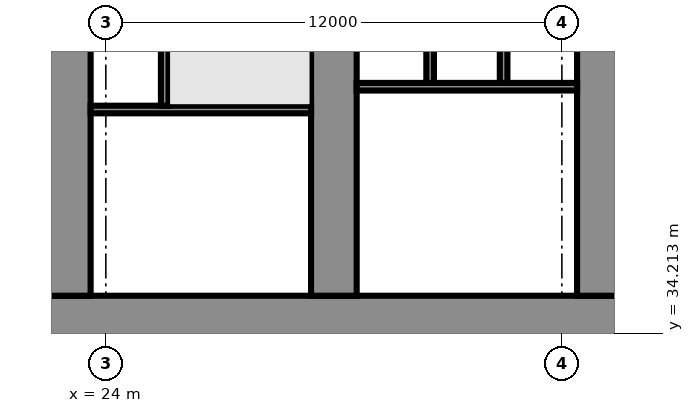
"""IFC4 building model, lengths in metres.
Left out: names, types, materials, properties, quantities, classifications, styles, units other than length and angle.
Written with IfcOpenShell. Run it as: python <this file> out.ifc"""

import sys

from ifc_helpers import new_model, si_unit, direction, frame, frame_2d, origin, place, context, subcontext, project, spatial, polyline, rectangle, outline, extrude, element, fill, save


model = new_model("IFC4")
c1 = context("Model", 3, precision=1e-05, world=origin(), true_north=direction((0.0, 1.0)))
c2 = subcontext(c1, "Body", "Model", "MODEL_VIEW")
j1 = project(units=[si_unit("LENGTHUNIT", "METRE"), si_unit("PLANEANGLEUNIT", "RADIAN")], contexts=[c1])
p1 = place(None, origin())
s1 = spatial("IfcSite", under=j1, at=p1, CompositionType="ELEMENT")
p2 = place(p1, origin())
s2 = spatial("IfcBuilding", under=s1, at=p2, CompositionType="ELEMENT")
p3 = place(p2, origin())
s3 = spatial("IfcBuildingStorey", under=s2, at=p3, CompositionType="ELEMENT", Elevation=0.0)
p4 = place(p3, frame((9.0, 34.6, 0.0), z_axis=(0.0, 0.0, 1.0), x_axis=(1.0, 0.0, 0.0)))
e1 = element("IfcWall", 1, at=p4, inside=s3, PredefinedType="SHEAR", context=c2, shape_type="SweptSolid", body=[
    extrude(rectangle(XDim=56.0, YDim=1.2, at=frame_2d((28.0, 0.0))), origin(), (0.0, 0.0, 1.0), 7.7),
])
p5 = place(p4, frame((3.3, 0.0, 0.0)))
e2 = element("IfcOpeningElement", 2, at=p5, cuts=e1, PredefinedType="OPENING", context=c2, shape_type="SweptSolid", body=[
    extrude(rectangle(XDim=1.0, YDim=2.1, at=frame_2d((0.5, 1.05))), frame((0.0, 0.61, 0.0), z_axis=(0.0, -1.0, 0.0), x_axis=(1.0, 0.0, 0.0)), (0.0, 0.0, 1.0), 1.22),
])
p6 = place(p4, frame((7.867, 0.0, 0.0)))
e3 = element("IfcOpeningElement", 3, at=p6, cuts=e1, PredefinedType="OPENING", context=c2, shape_type="SweptSolid", body=[
    extrude(rectangle(XDim=1.1, YDim=2.1, at=frame_2d((0.55, 1.05))), frame((0.0, 0.61, 0.0), z_axis=(0.0, -1.0, 0.0), x_axis=(1.0, 0.0, 0.0)), (0.0, 0.0, 1.0), 1.22),
])
p7 = place(p4, frame((12.033, 0.0, 0.0)))
e4 = element("IfcOpeningElement", 4, at=p7, cuts=e1, PredefinedType="OPENING", context=c2, shape_type="SweptSolid", body=[
    extrude(rectangle(XDim=1.1, YDim=2.1, at=frame_2d((0.55, 1.05))), frame((0.0, 0.61, 0.0), z_axis=(0.0, -1.0, 0.0), x_axis=(1.0, 0.0, 0.0)), (0.0, 0.0, 1.0), 1.22),
])
p8 = place(p4, frame((9.8, 0.0, 0.0)))
e5 = element("IfcOpeningElement", 5, at=p8, cuts=e1, PredefinedType="OPENING", context=c2, shape_type="SweptSolid", body=[
    extrude(rectangle(XDim=1.4, YDim=2.1, at=frame_2d((0.7, 1.05))), frame((0.0, 0.61, 0.0), z_axis=(0.0, -1.0, 0.0), x_axis=(1.0, 0.0, 0.0)), (0.0, 0.0, 1.0), 1.22),
])
p9 = place(p4, frame((14.65, 0.0, 0.0)))
e6 = element("IfcOpeningElement", 6, at=p9, cuts=e1, PredefinedType="OPENING", context=c2, shape_type="SweptSolid", body=[
    extrude(rectangle(XDim=1.2, YDim=2.1, at=frame_2d((0.6, 1.05))), frame((0.0, 0.61, 0.0), z_axis=(0.0, -1.0, 0.0), x_axis=(1.0, 0.0, 0.0)), (0.0, 0.0, 1.0), 1.22),
])
p10 = place(p4, frame((21.867, 0.0, 0.0)))
e7 = element("IfcOpeningElement", 7, at=p10, cuts=e1, PredefinedType="OPENING", context=c2, shape_type="SweptSolid", body=[
    extrude(rectangle(XDim=1.1, YDim=2.1, at=frame_2d((0.55, 1.05))), frame((0.0, 0.61, 0.0), z_axis=(0.0, -1.0, 0.0), x_axis=(1.0, 0.0, 0.0)), (0.0, 0.0, 1.0), 1.22),
])
p11 = place(p4, frame((26.033, 0.0, 0.0)))
e8 = element("IfcOpeningElement", 8, at=p11, cuts=e1, PredefinedType="OPENING", context=c2, shape_type="SweptSolid", body=[
    extrude(rectangle(XDim=1.1, YDim=2.1, at=frame_2d((0.55, 1.05))), frame((0.0, 0.61, 0.0), z_axis=(0.0, -1.0, 0.0), x_axis=(1.0, 0.0, 0.0)), (0.0, 0.0, 1.0), 1.22),
])
p12 = place(p4, frame((23.8, 0.0, 0.0)))
e9 = element("IfcOpeningElement", 9, at=p12, cuts=e1, PredefinedType="OPENING", context=c2, shape_type="SweptSolid", body=[
    extrude(rectangle(XDim=1.4, YDim=2.1, at=frame_2d((0.7, 1.05))), frame((0.0, 0.61, 0.0), z_axis=(0.0, -1.0, 0.0), x_axis=(1.0, 0.0, 0.0)), (0.0, 0.0, 1.0), 1.22),
])
p13 = place(p4, frame((28.867, 0.0, 0.0)))
e10 = element("IfcOpeningElement", 10, at=p13, cuts=e1, PredefinedType="OPENING", context=c2, shape_type="SweptSolid", body=[
    extrude(rectangle(XDim=1.1, YDim=2.1, at=frame_2d((0.55, 1.05))), frame((0.0, 0.61, 0.0), z_axis=(0.0, -1.0, 0.0), x_axis=(1.0, 0.0, 0.0)), (0.0, 0.0, 1.0), 1.22),
])
p14 = place(p4, frame((33.033, 0.0, 0.0)))
e11 = element("IfcOpeningElement", 11, at=p14, cuts=e1, PredefinedType="OPENING", context=c2, shape_type="SweptSolid", body=[
    extrude(rectangle(XDim=1.1, YDim=2.1, at=frame_2d((0.55, 1.05))), frame((0.0, 0.61, 0.0), z_axis=(0.0, -1.0, 0.0), x_axis=(1.0, 0.0, 0.0)), (0.0, 0.0, 1.0), 1.22),
])
p15 = place(p4, frame((40.15, 0.0, 0.0)))
e12 = element("IfcOpeningElement", 12, at=p15, cuts=e1, PredefinedType="OPENING", context=c2, shape_type="SweptSolid", body=[
    extrude(rectangle(XDim=1.2, YDim=2.1, at=frame_2d((0.6, 1.05))), frame((0.0, 0.61, 0.0), z_axis=(0.0, -1.0, 0.0), x_axis=(1.0, 0.0, 0.0)), (0.0, 0.0, 1.0), 1.22),
])
p16 = place(p4, frame((42.867, 0.0, 0.0)))
e13 = element("IfcOpeningElement", 13, at=p16, cuts=e1, PredefinedType="OPENING", context=c2, shape_type="SweptSolid", body=[
    extrude(rectangle(XDim=1.1, YDim=2.1, at=frame_2d((0.55, 1.05))), frame((0.0, 0.61, 0.0), z_axis=(0.0, -1.0, 0.0), x_axis=(1.0, 0.0, 0.0)), (0.0, 0.0, 1.0), 1.22),
])
p17 = place(p4, frame((47.033, 0.0, 0.0)))
e14 = element("IfcOpeningElement", 14, at=p17, cuts=e1, PredefinedType="OPENING", context=c2, shape_type="SweptSolid", body=[
    extrude(rectangle(XDim=1.1, YDim=2.1, at=frame_2d((0.55, 1.05))), frame((0.0, 0.61, 0.0), z_axis=(0.0, -1.0, 0.0), x_axis=(1.0, 0.0, 0.0)), (0.0, 0.0, 1.0), 1.22),
])
p18 = place(p4, frame((44.8, 0.0, 0.0)))
e15 = element("IfcOpeningElement", 15, at=p18, cuts=e1, PredefinedType="OPENING", context=c2, shape_type="SweptSolid", body=[
    extrude(rectangle(XDim=1.4, YDim=2.1, at=frame_2d((0.7, 1.05))), frame((0.0, 0.61, 0.0), z_axis=(0.0, -1.0, 0.0), x_axis=(1.0, 0.0, 0.0)), (0.0, 0.0, 1.0), 1.22),
])
p19 = place(p4, frame((49.867, 0.0, 0.0)))
e16 = element("IfcOpeningElement", 16, at=p19, cuts=e1, PredefinedType="OPENING", context=c2, shape_type="SweptSolid", body=[
    extrude(rectangle(XDim=1.1, YDim=2.1, at=frame_2d((0.55, 1.05))), frame((0.0, 0.61, 0.0), z_axis=(0.0, -1.0, 0.0), x_axis=(1.0, 0.0, 0.0)), (0.0, 0.0, 1.0), 1.22),
])
p20 = place(p4, frame((53.5, 0.0, 0.0)))
e17 = element("IfcOpeningElement", 17, at=p20, cuts=e1, PredefinedType="OPENING", context=c2, shape_type="SweptSolid", body=[
    extrude(rectangle(XDim=1.1, YDim=2.1, at=frame_2d((0.55, 1.05))), frame((0.0, 0.61, 0.0), z_axis=(0.0, -1.0, 0.0), x_axis=(1.0, 0.0, 0.0)), (0.0, 0.0, 1.0), 1.22),
])
p21 = place(p4, frame((51.567, 0.0, 0.0)))
e18 = element("IfcOpeningElement", 18, at=p21, cuts=e1, PredefinedType="OPENING", context=c2, shape_type="SweptSolid", body=[
    extrude(rectangle(XDim=1.4, YDim=2.1, at=frame_2d((0.7, 1.05))), frame((0.0, 0.61, 0.0), z_axis=(0.0, -1.0, 0.0), x_axis=(1.0, 0.0, 0.0)), (0.0, 0.0, 1.0), 1.22),
])
p22 = place(p3, frame((23.0, 35.2, 0.0), z_axis=(0.0, 0.0, 1.0), x_axis=(0.0, 1.0, 0.0)))
e19 = element("IfcWall", 19, at=p22, inside=s3, PredefinedType="SHEAR", context=c2, shape_type="SweptSolid", body=[
    extrude(rectangle(XDim=12.8, YDim=1.2, at=frame_2d((6.4, 0.0))), origin(), (0.0, 0.0, 1.0), 7.7),
])
p23 = place(p22, frame((10.414, 0.0, 0.0)))
e20 = element("IfcOpeningElement", 20, at=p23, cuts=e19, PredefinedType="OPENING", context=c2, shape_type="SweptSolid", body=[
    extrude(rectangle(XDim=1.0, YDim=2.1, at=frame_2d((0.5, 1.05))), frame((0.0, 0.61, 0.0), z_axis=(0.0, -1.0, 0.0), x_axis=(1.0, 0.0, 0.0)), (0.0, 0.0, 1.0), 1.22),
])
p24 = place(p22, frame((3.2, 0.0, 0.0)))
e21 = element("IfcOpeningElement", 21, at=p24, cuts=e19, PredefinedType="OPENING", context=c2, shape_type="SweptSolid", body=[
    extrude(rectangle(XDim=1.1, YDim=2.1, at=frame_2d((0.55, 1.05))), frame((0.0, 0.61, 0.0), z_axis=(0.0, -1.0, 0.0), x_axis=(1.0, 0.0, 0.0)), (0.0, 0.0, 1.0), 1.22),
])
p25 = place(p3, frame((30.0, 35.2, 0.0), z_axis=(0.0, 0.0, 1.0), x_axis=(0.0, 1.0, 0.0)))
e22 = element("IfcWall", 22, at=p25, inside=s3, PredefinedType="SHEAR", context=c2, shape_type="SweptSolid", body=[
    extrude(rectangle(XDim=12.8, YDim=1.2, at=frame_2d((6.4, 0.0))), origin(), (0.0, 0.0, 1.0), 7.7),
])
p26 = place(p25, frame((3.2, 0.0, 0.0)))
e23 = element("IfcOpeningElement", 23, at=p26, cuts=e22, PredefinedType="OPENING", context=c2, shape_type="SweptSolid", body=[
    extrude(rectangle(XDim=1.1, YDim=2.1, at=frame_2d((0.55, 1.05))), frame((0.0, 0.61, 0.0), z_axis=(0.0, -1.0, 0.0), x_axis=(1.0, 0.0, 0.0)), (0.0, 0.0, 1.0), 1.22),
])
p27 = place(p3, frame((37.0, 35.2, 0.0), z_axis=(0.0, 0.0, 1.0), x_axis=(0.0, 1.0, 0.0)))
e24 = element("IfcWall", 24, at=p27, inside=s3, PredefinedType="SHEAR", context=c2, shape_type="SweptSolid", body=[
    extrude(rectangle(XDim=12.8, YDim=1.2, at=frame_2d((6.4, 0.0))), origin(), (0.0, 0.0, 1.0), 7.7),
])
p28 = place(p27, frame((3.2, 0.0, 0.0)))
e25 = element("IfcOpeningElement", 25, at=p28, cuts=e24, PredefinedType="OPENING", context=c2, shape_type="SweptSolid", body=[
    extrude(rectangle(XDim=1.1, YDim=2.1, at=frame_2d((0.55, 1.05))), frame((0.0, 0.61, 0.0), z_axis=(0.0, -1.0, 0.0), x_axis=(1.0, 0.0, 0.0)), (0.0, 0.0, 1.0), 1.22),
])
p29 = place(p27, frame((9.6, 0.0, 0.0)))
e26 = element("IfcOpeningElement", 26, at=p29, cuts=e24, PredefinedType="OPENING", context=c2, shape_type="SweptSolid", body=[
    extrude(rectangle(XDim=1.0, YDim=2.1, at=frame_2d((0.5, 1.05))), frame((0.0, 0.61, 0.0), z_axis=(0.0, -1.0, 0.0), x_axis=(1.0, 0.0, 0.0)), (0.0, 0.0, 1.0), 1.22),
])
p30 = place(p3, frame((23.6, 40.1, 0.0), z_axis=(0.0, 0.0, 1.0), x_axis=(1.0, 0.0, 0.0)))
e27 = element("IfcWall", 27, at=p30, inside=s3, PredefinedType="SHEAR", context=c2, shape_type="SweptSolid", body=[
    extrude(rectangle(XDim=5.8, YDim=0.2, at=frame_2d((2.9, 0.0))), origin(), (0.0, 0.0, 1.0), 7.7),
])
p31 = place(p30, frame((3.325, 0.0, 0.0)))
e28 = element("IfcOpeningElement", 28, at=p31, cuts=e27, PredefinedType="OPENING", context=c2, shape_type="SweptSolid", body=[
    extrude(rectangle(XDim=1.2, YDim=2.1, at=frame_2d((0.6, 1.05))), frame((0.0, 0.11, 0.0), z_axis=(0.0, -1.0, 0.0), x_axis=(1.0, 0.0, 0.0)), (0.0, 0.0, 1.0), 0.22),
])
p32 = place(p30, frame((0.475, 0.0, 0.0)))
e29 = element("IfcOpeningElement", 29, at=p32, cuts=e27, PredefinedType="OPENING", context=c2, shape_type="SweptSolid", body=[
    extrude(rectangle(XDim=0.9, YDim=2.1, at=frame_2d((0.45, 1.05))), frame((0.0, 0.11, 0.0), z_axis=(0.0, -1.0, 0.0), x_axis=(1.0, 0.0, 0.0)), (0.0, 0.0, 1.0), 0.22),
])
p33 = place(p3, frame((25.55, 40.2, 0.0), z_axis=(0.0, 0.0, 1.0), x_axis=(0.0, 1.0, 0.0)))
e30 = element("IfcWall", 30, at=p33, inside=s3, PredefinedType="SHEAR", context=c2, shape_type="SweptSolid", body=[
    extrude(rectangle(XDim=7.2, YDim=0.2, at=frame_2d((3.6, 0.0))), origin(), (0.0, 0.0, 1.0), 7.7),
])
p34 = place(p3, frame((30.6, 40.7, 0.0), z_axis=(0.0, 0.0, 1.0), x_axis=(1.0, 0.0, 0.0)))
e31 = element("IfcWall", 31, at=p34, inside=s3, PredefinedType="PARTITIONING", context=c2, shape_type="SweptSolid", body=[
    extrude(rectangle(XDim=5.8, YDim=0.2, at=frame_2d((2.9, 0.0))), origin(), (0.0, 0.0, 1.0), 7.7),
])
p35 = place(p34, frame((0.467, 0.0, 0.0)))
e32 = element("IfcOpeningElement", 32, at=p35, cuts=e31, PredefinedType="OPENING", context=c2, shape_type="SweptSolid", body=[
    extrude(rectangle(XDim=1.0, YDim=2.1, at=frame_2d((0.5, 1.05))), frame((0.0, 0.11, 0.0), z_axis=(0.0, -1.0, 0.0), x_axis=(1.0, 0.0, 0.0)), (0.0, 0.0, 1.0), 0.22),
])
p36 = place(p34, frame((2.4, 0.0, 0.0)))
e33 = element("IfcOpeningElement", 33, at=p36, cuts=e31, PredefinedType="OPENING", context=c2, shape_type="SweptSolid", body=[
    extrude(rectangle(XDim=1.0, YDim=2.1, at=frame_2d((0.5, 1.05))), frame((0.0, 0.11, 0.0), z_axis=(0.0, -1.0, 0.0), x_axis=(1.0, 0.0, 0.0)), (0.0, 0.0, 1.0), 0.22),
])
p37 = place(p34, frame((4.333, 0.0, 0.0)))
e34 = element("IfcOpeningElement", 34, at=p37, cuts=e31, PredefinedType="OPENING", context=c2, shape_type="SweptSolid", body=[
    extrude(rectangle(XDim=1.0, YDim=2.1, at=frame_2d((0.5, 1.05))), frame((0.0, 0.11, 0.0), z_axis=(0.0, -1.0, 0.0), x_axis=(1.0, 0.0, 0.0)), (0.0, 0.0, 1.0), 0.22),
])
p38 = place(p3, frame((0.0, 0.0, -0.0)))
e35 = element("IfcWall", 35, at=p38, inside=s3, PredefinedType="PARTITIONING", context=c2, shape_type="SweptSolid", body=[
    extrude(outline(polyline([(32.233, 38.05), (30.6, 38.05), (30.6, 38.25), (32.233, 38.25), (32.433, 38.25), (32.433, 35.2), (32.233, 35.2), (32.233, 38.05)])), origin(), (0.0, 0.0, 1.0), 7.7),
])
p39 = place(p3, frame((0.0, 0.0, -0.0)))
e36 = element("IfcWall", 36, at=p39, inside=s3, PredefinedType="PARTITIONING", context=c2, shape_type="SweptSolid", body=[
    extrude(outline(polyline([(34.567, 38.25), (34.767, 38.25), (36.4, 38.25), (36.4, 38.05), (34.767, 38.05), (34.767, 35.2), (34.567, 35.2), (34.567, 38.25)])), origin(), (0.0, 0.0, 1.0), 7.7),
])
for number, where, z_axis, x_axis in (
    (37, (32.533, 40.8, 0.0), (0.0, 0.0, 1.0), (0.0, 1.0, 0.0)),
    (38, (34.467, 40.8, 0.0), (0.0, 0.0, 1.0), (0.0, 1.0, 0.0)),
):
    element("IfcWall", number, at=place(p3, frame(where, z_axis=z_axis, x_axis=x_axis)), inside=s3, PredefinedType="PARTITIONING", context=c2, shape_type="SweptSolid", body=[
        extrude(rectangle(XDim=8.653, YDim=0.2, at=frame_2d((4.326, 0.0))), origin(), (0.0, 0.0, 1.0), 7.7),
    ])
p40 = place(p31, origin())
e39 = element("IfcDoor", 39, at=p40, inside=s3, OperationType="SINGLE_SWING_RIGHT", PredefinedType="DOOR", context=c2, shape_type="SweptSolid", body=[
    extrude(rectangle(XDim=1.2, YDim=2.1, at=frame_2d((0.6, 1.05))), frame((0.0, 0.025, 0.0), z_axis=(0.0, -1.0, 0.0), x_axis=(1.0, 0.0, 0.0)), (0.0, 0.0, 1.0), 0.05),
])
fill(e28, e39)
p41 = place(p32, origin())
e40 = element("IfcDoor", 40, at=p41, inside=s3, OperationType="SINGLE_SWING_LEFT", PredefinedType="DOOR", context=c2, shape_type="SweptSolid", body=[
    extrude(rectangle(XDim=0.9, YDim=2.1, at=frame_2d((0.45, 1.05))), frame((0.0, 0.025, 0.0), z_axis=(0.0, -1.0, 0.0), x_axis=(1.0, 0.0, 0.0)), (0.0, 0.0, 1.0), 0.05),
])
fill(e29, e40)
p42 = place(p9, origin())
e41 = element("IfcDoor", 41, at=p42, inside=s3, OperationType="SINGLE_SWING_LEFT", PredefinedType="DOOR", context=c2, shape_type="SweptSolid", body=[
    extrude(rectangle(XDim=1.2, YDim=2.1, at=frame_2d((0.6, 1.05))), frame((0.0, 0.025, 0.0), z_axis=(0.0, -1.0, 0.0), x_axis=(1.0, 0.0, 0.0)), (0.0, 0.0, 1.0), 0.05),
])
fill(e6, e41)
p43 = place(p10, origin())
e42 = element("IfcDoor", 42, at=p43, inside=s3, OperationType="DOUBLE_DOOR_SLIDING", PredefinedType="DOOR", context=c2, shape_type="SweptSolid", body=[
    extrude(rectangle(XDim=1.1, YDim=2.1, at=frame_2d((0.55, 1.05))), frame((0.0, 0.025, 0.0), z_axis=(0.0, -1.0, 0.0), x_axis=(1.0, 0.0, 0.0)), (0.0, 0.0, 1.0), 0.05),
])
fill(e7, e42)
p44 = place(p11, origin())
e43 = element("IfcDoor", 43, at=p44, inside=s3, OperationType="DOUBLE_DOOR_SLIDING", PredefinedType="DOOR", context=c2, shape_type="SweptSolid", body=[
    extrude(rectangle(XDim=1.1, YDim=2.1, at=frame_2d((0.55, 1.05))), frame((0.0, 0.025, 0.0), z_axis=(0.0, -1.0, 0.0), x_axis=(1.0, 0.0, 0.0)), (0.0, 0.0, 1.0), 0.05),
])
fill(e8, e43)
p45 = place(p12, origin())
e44 = element("IfcDoor", 44, at=p45, inside=s3, OperationType="DOUBLE_DOOR_SINGLE_SWING", PredefinedType="DOOR", context=c2, shape_type="SweptSolid", body=[
    extrude(rectangle(XDim=1.4, YDim=2.1, at=frame_2d((0.7, 1.05))), frame((0.0, 0.025, 0.0), z_axis=(0.0, -1.0, 0.0), x_axis=(1.0, 0.0, 0.0)), (0.0, 0.0, 1.0), 0.05),
])
fill(e9, e44)
p46 = place(p35, origin())
e45 = element("IfcDoor", 45, at=p46, inside=s3, OperationType="SINGLE_SWING_LEFT", PredefinedType="DOOR", context=c2, shape_type="SweptSolid", body=[
    extrude(rectangle(XDim=1.0, YDim=2.1, at=frame_2d((0.5, 1.05))), frame((0.0, 0.025, 0.0), z_axis=(0.0, -1.0, 0.0), x_axis=(1.0, 0.0, 0.0)), (0.0, 0.0, 1.0), 0.05),
])
fill(e32, e45)
p47 = place(p36, origin())
e46 = element("IfcDoor", 46, at=p47, inside=s3, OperationType="SINGLE_SWING_LEFT", PredefinedType="DOOR", context=c2, shape_type="SweptSolid", body=[
    extrude(rectangle(XDim=1.0, YDim=2.1, at=frame_2d((0.5, 1.05))), frame((0.0, 0.025, 0.0), z_axis=(0.0, -1.0, 0.0), x_axis=(1.0, 0.0, 0.0)), (0.0, 0.0, 1.0), 0.05),
])
fill(e33, e46)
p48 = place(p37, origin())
e47 = element("IfcDoor", 47, at=p48, inside=s3, OperationType="SINGLE_SWING_LEFT", PredefinedType="DOOR", context=c2, shape_type="SweptSolid", body=[
    extrude(rectangle(XDim=1.0, YDim=2.1, at=frame_2d((0.5, 1.05))), frame((0.0, 0.025, 0.0), z_axis=(0.0, -1.0, 0.0), x_axis=(1.0, 0.0, 0.0)), (0.0, 0.0, 1.0), 0.05),
])
fill(e34, e47)
p49 = place(p24, origin())
e48 = element("IfcDoor", 48, at=p49, inside=s3, OperationType="SINGLE_SWING_RIGHT", PredefinedType="DOOR", context=c2, shape_type="SweptSolid", body=[
    extrude(rectangle(XDim=1.1, YDim=2.1, at=frame_2d((0.55, 1.05))), frame((0.0, 0.025, 0.0), z_axis=(0.0, -1.0, 0.0), x_axis=(1.0, 0.0, 0.0)), (0.0, 0.0, 1.0), 0.05),
])
fill(e21, e48)
p50 = place(p26, origin())
e49 = element("IfcDoor", 49, at=p50, inside=s3, OperationType="SINGLE_SWING_LEFT", PredefinedType="DOOR", context=c2, shape_type="SweptSolid", body=[
    extrude(rectangle(XDim=1.1, YDim=2.1, at=frame_2d((0.55, 1.05))), frame((0.0, 0.025, 0.0), z_axis=(0.0, -1.0, 0.0), x_axis=(1.0, 0.0, 0.0)), (0.0, 0.0, 1.0), 0.05),
])
fill(e23, e49)
p51 = place(p28, origin())
e50 = element("IfcDoor", 50, at=p51, inside=s3, OperationType="SINGLE_SWING_RIGHT", PredefinedType="DOOR", context=c2, shape_type="SweptSolid", body=[
    extrude(rectangle(XDim=1.1, YDim=2.1, at=frame_2d((0.55, 1.05))), frame((0.0, 0.025, 0.0), z_axis=(0.0, -1.0, 0.0), x_axis=(1.0, 0.0, 0.0)), (0.0, 0.0, 1.0), 0.05),
])
fill(e25, e50)
save(model, sys.argv[1])
